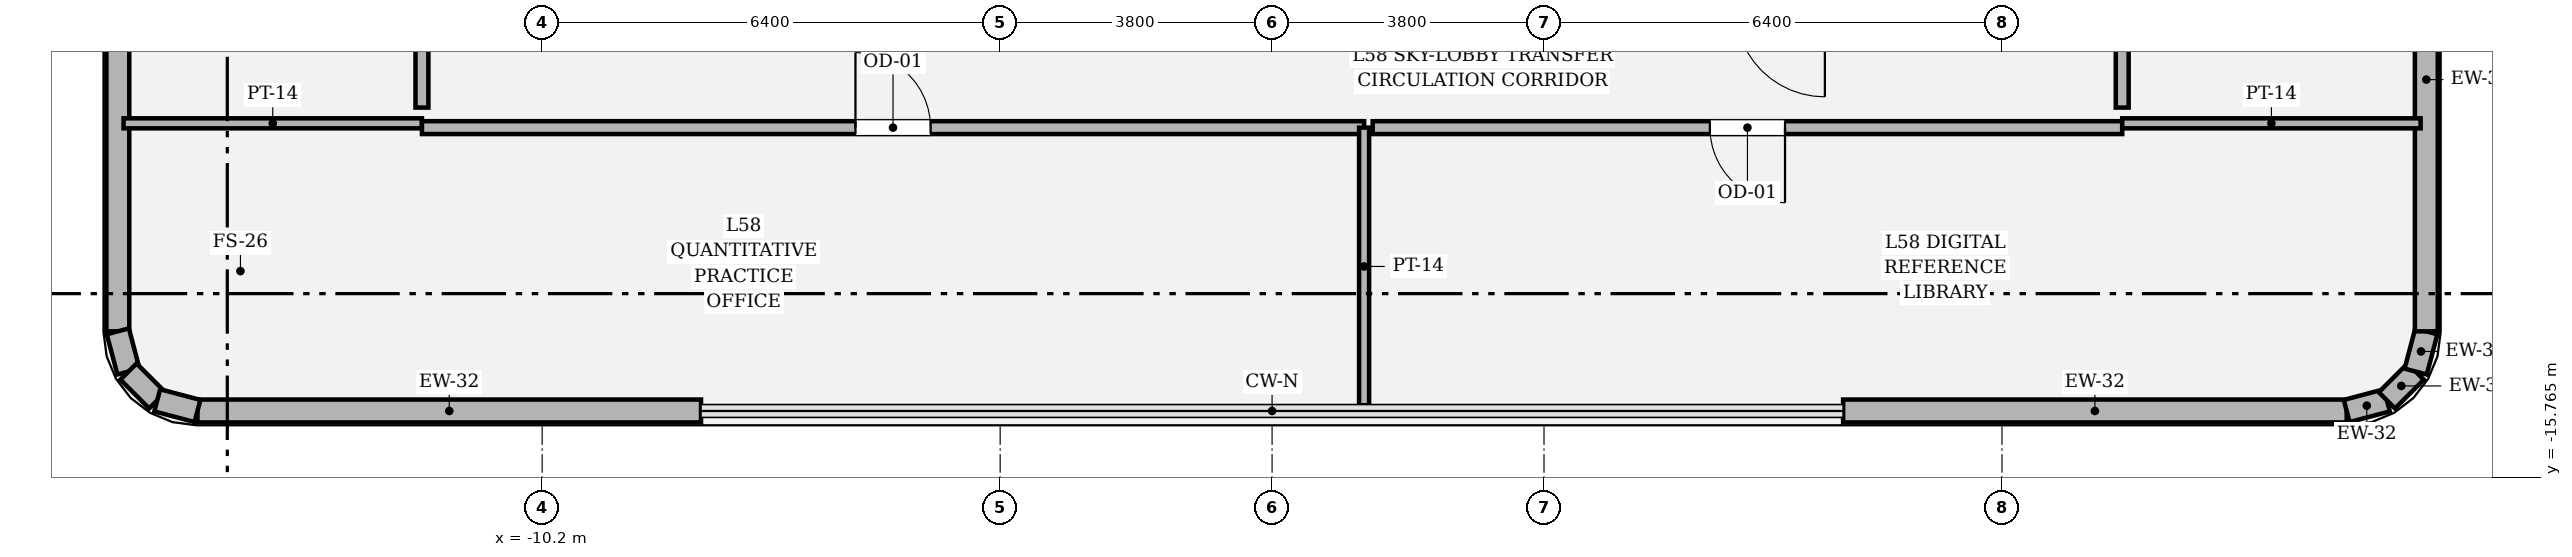
"""IFC4 building model, lengths in metres.
Left out: names, types, materials, properties, quantities, classifications, styles, units other than length and angle.
Written with IfcOpenShell. Run it as: python <this file> out.ifc"""

import sys

from ifc_helpers import new_model, si_unit, direction, frame, frame_2d, origin, place, context, subcontext, project, spatial, rectangle, extrude, element, fill, save


model = new_model("IFC4")
c1 = context("Model", 3, precision=1e-05, world=origin(), true_north=direction((0.0, 1.0)))
c2 = subcontext(c1, "Body", "Model", "MODEL_VIEW")
j1 = project(units=[si_unit("LENGTHUNIT", "METRE"), si_unit("PLANEANGLEUNIT", "RADIAN")], contexts=[c1])
p1 = place(None, origin())
s1 = spatial("IfcSite", under=j1, at=p1, CompositionType="ELEMENT")
p2 = place(p1, origin())
s2 = spatial("IfcBuilding", under=s1, at=p2, CompositionType="ELEMENT")
p3 = place(p2, frame((0.0, 0.0, 246.6)))
s3 = spatial("IfcBuildingStorey", under=s2, at=p3, CompositionType="ELEMENT", Elevation=246.6)
for number, where, z_axis, x_axis in (
    (1, (-15.017, -14.84, 0.0), (0.0, 0.0, 1.0), (1.0, 0.0, 0.0)),
    (2, (7.98, -14.84, 0.0), (0.0, 0.0, 1.0), (1.0, 0.0, 0.0)),
):
    element("IfcWall", number, at=place(p3, frame(where, z_axis=z_axis, x_axis=x_axis)), inside=s3, PredefinedType="SOLIDWALL", context=c2, shape_type="SweptSolid", body=[
        extrude(rectangle(XDim=7.037, YDim=0.32, at=frame_2d((3.519, 0.0))), origin(), (0.0, 0.0, 1.0), 3.194),
    ])
p4 = place(p3, frame((15.017, -14.84, 0.0), z_axis=(0.0, 0.0, 1.0), x_axis=(0.966665515501, 0.256042537758, 0.0)))
e3 = element("IfcWall", 3, at=p4, inside=s3, PredefinedType="SOLIDWALL", context=c2, shape_type="SweptSolid", body=[
    extrude(rectangle(XDim=0.582, YDim=0.32, at=frame_2d((0.291, 0.0))), origin(), (0.0, 0.0, 1.0), 4.52),
])
p5 = place(p3, frame((15.579, -14.691, 0.0), z_axis=(0.0, 0.0, 1.0), x_axis=(0.707106781187, 0.707106781187, 0.0)))
e4 = element("IfcWall", 4, at=p5, inside=s3, PredefinedType="SOLIDWALL", context=c2, shape_type="SweptSolid", body=[
    extrude(rectangle(XDim=0.569, YDim=0.32, at=frame_2d((0.284, 0.0))), origin(), (0.0, 0.0, 1.0), 4.52),
])
p6 = place(p3, frame((15.981, -14.289, 0.0), z_axis=(0.0, 0.0, 1.0), x_axis=(0.255650250031, 0.966769336325, 0.0)))
e5 = element("IfcWall", 5, at=p6, inside=s3, PredefinedType="SOLIDWALL", context=c2, shape_type="SweptSolid", body=[
    extrude(rectangle(XDim=0.582, YDim=0.32, at=frame_2d((0.291, 0.0))), origin(), (0.0, 0.0, 1.0), 4.52),
])
for number, where, z_axis, x_axis in (
    (6, (16.13, -13.727, 0.0), (0.0, 0.0, 1.0), (0.0, 1.0, 0.0)),
    (7, (-16.13, -6.69, 0.0), (0.0, 0.0, 1.0), (0.0, -1.0, 0.0)),
):
    element("IfcWall", number, at=place(p3, frame(where, z_axis=z_axis, x_axis=x_axis)), inside=s3, PredefinedType="SOLIDWALL", context=c2, shape_type="SweptSolid", body=[
        extrude(rectangle(XDim=7.037, YDim=0.32, at=frame_2d((3.519, 0.0))), origin(), (0.0, 0.0, 1.0), 3.194),
    ])
p7 = place(p3, frame((-16.13, -13.727, 0.0), z_axis=(0.0, 0.0, 1.0), x_axis=(0.255650250031, -0.966769336325, 0.0)))
e8 = element("IfcWall", 8, at=p7, inside=s3, PredefinedType="SOLIDWALL", context=c2, shape_type="SweptSolid", body=[
    extrude(rectangle(XDim=0.582, YDim=0.32, at=frame_2d((0.291, 0.0))), origin(), (0.0, 0.0, 1.0), 4.52),
])
p8 = place(p3, frame((-15.981, -14.289, 0.0), z_axis=(0.0, 0.0, 1.0), x_axis=(0.707106781187, -0.707106781187, 0.0)))
e9 = element("IfcWall", 9, at=p8, inside=s3, PredefinedType="SOLIDWALL", context=c2, shape_type="SweptSolid", body=[
    extrude(rectangle(XDim=0.569, YDim=0.32, at=frame_2d((0.284, 0.0))), origin(), (0.0, 0.0, 1.0), 4.52),
])
p9 = place(p3, frame((-15.579, -14.691, 0.0), z_axis=(0.0, 0.0, 1.0), x_axis=(0.966665515501, -0.256042537758, 0.0)))
e10 = element("IfcWall", 10, at=p9, inside=s3, PredefinedType="SOLIDWALL", context=c2, shape_type="SweptSolid", body=[
    extrude(rectangle(XDim=0.582, YDim=0.32, at=frame_2d((0.291, 0.0))), origin(), (0.0, 0.0, 1.0), 4.52),
])
p10 = place(p3, frame((-16.05, -10.82, 0.0), z_axis=(0.0, 0.0, 1.0), x_axis=(1.0, 0.0, 0.0)))
e11 = element("IfcWall", 11, at=p10, inside=s3, PredefinedType="PARTITIONING", context=c2, shape_type="SweptSolid", body=[
    extrude(rectangle(XDim=4.17, YDim=0.14, at=frame_2d((2.085, 0.0))), origin(), (0.0, 0.0, 1.0), 4.154),
])
p11 = place(p3, frame((-11.88, -10.88, 0.0), z_axis=(0.0, 0.0, 1.0), x_axis=(1.0, 0.0, 0.0)))
e12 = element("IfcWall", 12, at=p11, inside=s3, PredefinedType="PARTITIONING", context=c2, shape_type="SweptSolid", body=[
    extrude(rectangle(XDim=13.166, YDim=0.18, at=frame_2d((6.583, 0.0))), origin(), (0.0, 0.0, 1.0), 3.194),
])
p12 = place(p11, frame((6.058, 0.0, 0.0)))
e13 = element("IfcOpeningElement", 13, at=p12, cuts=e12, PredefinedType="OPENING", context=c2, shape_type="SweptSolid", body=[
    extrude(rectangle(XDim=1.05, YDim=2.2, at=frame_2d((0.525, 1.1))), frame((0.0, 0.1, 0.0), z_axis=(0.0, -1.0, 0.0), x_axis=(1.0, 0.0, 0.0)), (0.0, 0.0, 1.0), 0.2),
])
p13 = place(p3, frame((1.286, -10.88, 0.0), z_axis=(0.0, 0.0, 1.0), x_axis=(0.0, -1.0, 0.0)))
e14 = element("IfcWall", 14, at=p13, inside=s3, PredefinedType="PARTITIONING", context=c2, shape_type="SweptSolid", body=[
    extrude(rectangle(XDim=3.88, YDim=0.14, at=frame_2d((1.94, 0.0))), origin(), (0.0, 0.0, 1.0), 4.52),
])
p14 = place(p3, frame((1.406, -10.88, 0.0), z_axis=(0.0, 0.0, 1.0), x_axis=(1.0, 0.0, 0.0)))
e15 = element("IfcWall", 15, at=p14, inside=s3, PredefinedType="PARTITIONING", context=c2, shape_type="SweptSolid", body=[
    extrude(rectangle(XDim=10.474, YDim=0.18, at=frame_2d((5.237, 0.0))), origin(), (0.0, 0.0, 1.0), 3.194),
])
p15 = place(p14, frame((4.712, 0.0, 0.0)))
e16 = element("IfcOpeningElement", 16, at=p15, cuts=e15, PredefinedType="OPENING", context=c2, shape_type="SweptSolid", body=[
    extrude(rectangle(XDim=1.05, YDim=2.2, at=frame_2d((0.525, 1.1))), frame((0.0, 0.1, 0.0), z_axis=(0.0, -1.0, 0.0), x_axis=(1.0, 0.0, 0.0)), (0.0, 0.0, 1.0), 0.2),
])
p16 = place(p3, frame((11.88, -10.82, 0.0), z_axis=(0.0, 0.0, 1.0), x_axis=(1.0, 0.0, 0.0)))
e17 = element("IfcWall", 17, at=p16, inside=s3, PredefinedType="PARTITIONING", context=c2, shape_type="SweptSolid", body=[
    extrude(rectangle(XDim=4.17, YDim=0.14, at=frame_2d((2.085, 0.0))), origin(), (0.0, 0.0, 1.0), 4.154),
])
p17 = place(p3, frame((-11.88, -0.06, 0.0), z_axis=(0.0, 0.0, 1.0), x_axis=(0.0, -1.0, 0.0)))
e18 = element("IfcWall", 18, at=p17, inside=s3, PredefinedType="PARTITIONING", context=c2, shape_type="SweptSolid", body=[
    extrude(rectangle(XDim=10.54, YDim=0.18, at=frame_2d((5.27, 0.0))), origin(), (0.0, 0.0, 1.0), 3.194),
])
p18 = place(p17, frame((4.745, 0.0, 0.0)))
e19 = element("IfcOpeningElement", 19, at=p18, cuts=e18, PredefinedType="OPENING", context=c2, shape_type="SweptSolid", body=[
    extrude(rectangle(XDim=1.05, YDim=2.2, at=frame_2d((0.525, 1.1))), frame((0.0, 0.1, 0.0), z_axis=(0.0, -1.0, 0.0), x_axis=(1.0, 0.0, 0.0)), (0.0, 0.0, 1.0), 0.2),
])
p19 = place(p3, frame((11.88, -10.6, 0.0), z_axis=(0.0, 0.0, 1.0), x_axis=(0.0, 1.0, 0.0)))
e20 = element("IfcWall", 20, at=p19, inside=s3, PredefinedType="PARTITIONING", context=c2, shape_type="SweptSolid", body=[
    extrude(rectangle(XDim=10.54, YDim=0.18, at=frame_2d((5.27, 0.0))), origin(), (0.0, 0.0, 1.0), 3.194),
])
p20 = place(p19, frame((4.76, 0.0, 0.0)))
e21 = element("IfcOpeningElement", 21, at=p20, cuts=e20, PredefinedType="OPENING", context=c2, shape_type="SweptSolid", body=[
    extrude(rectangle(XDim=1.02, YDim=2.2, at=frame_2d((0.51, 1.1))), frame((0.0, 0.1, 0.0), z_axis=(0.0, -1.0, 0.0), x_axis=(1.0, 0.0, 0.0)), (0.0, 0.0, 1.0), 0.2),
])
p21 = place(p12, origin())
e22 = element("IfcDoor", 22, at=p21, inside=s3, OperationType="SINGLE_SWING_LEFT", PredefinedType="DOOR", context=c2, shape_type="SweptSolid", body=[
    extrude(rectangle(XDim=1.05, YDim=2.2, at=frame_2d((0.525, 1.1))), frame((0.0, 0.025, 0.0), z_axis=(0.0, -1.0, 0.0), x_axis=(1.0, 0.0, 0.0)), (0.0, 0.0, 1.0), 0.05),
])
fill(e13, e22)
p22 = place(p15, origin())
e23 = element("IfcDoor", 23, at=p22, inside=s3, OperationType="SINGLE_SWING_RIGHT", PredefinedType="DOOR", context=c2, shape_type="SweptSolid", body=[
    extrude(rectangle(XDim=1.05, YDim=2.2, at=frame_2d((0.525, 1.1))), frame((0.0, 0.025, 0.0), z_axis=(0.0, -1.0, 0.0), x_axis=(1.0, 0.0, 0.0)), (0.0, 0.0, 1.0), 0.05),
])
fill(e16, e23)
save(model, sys.argv[1])
